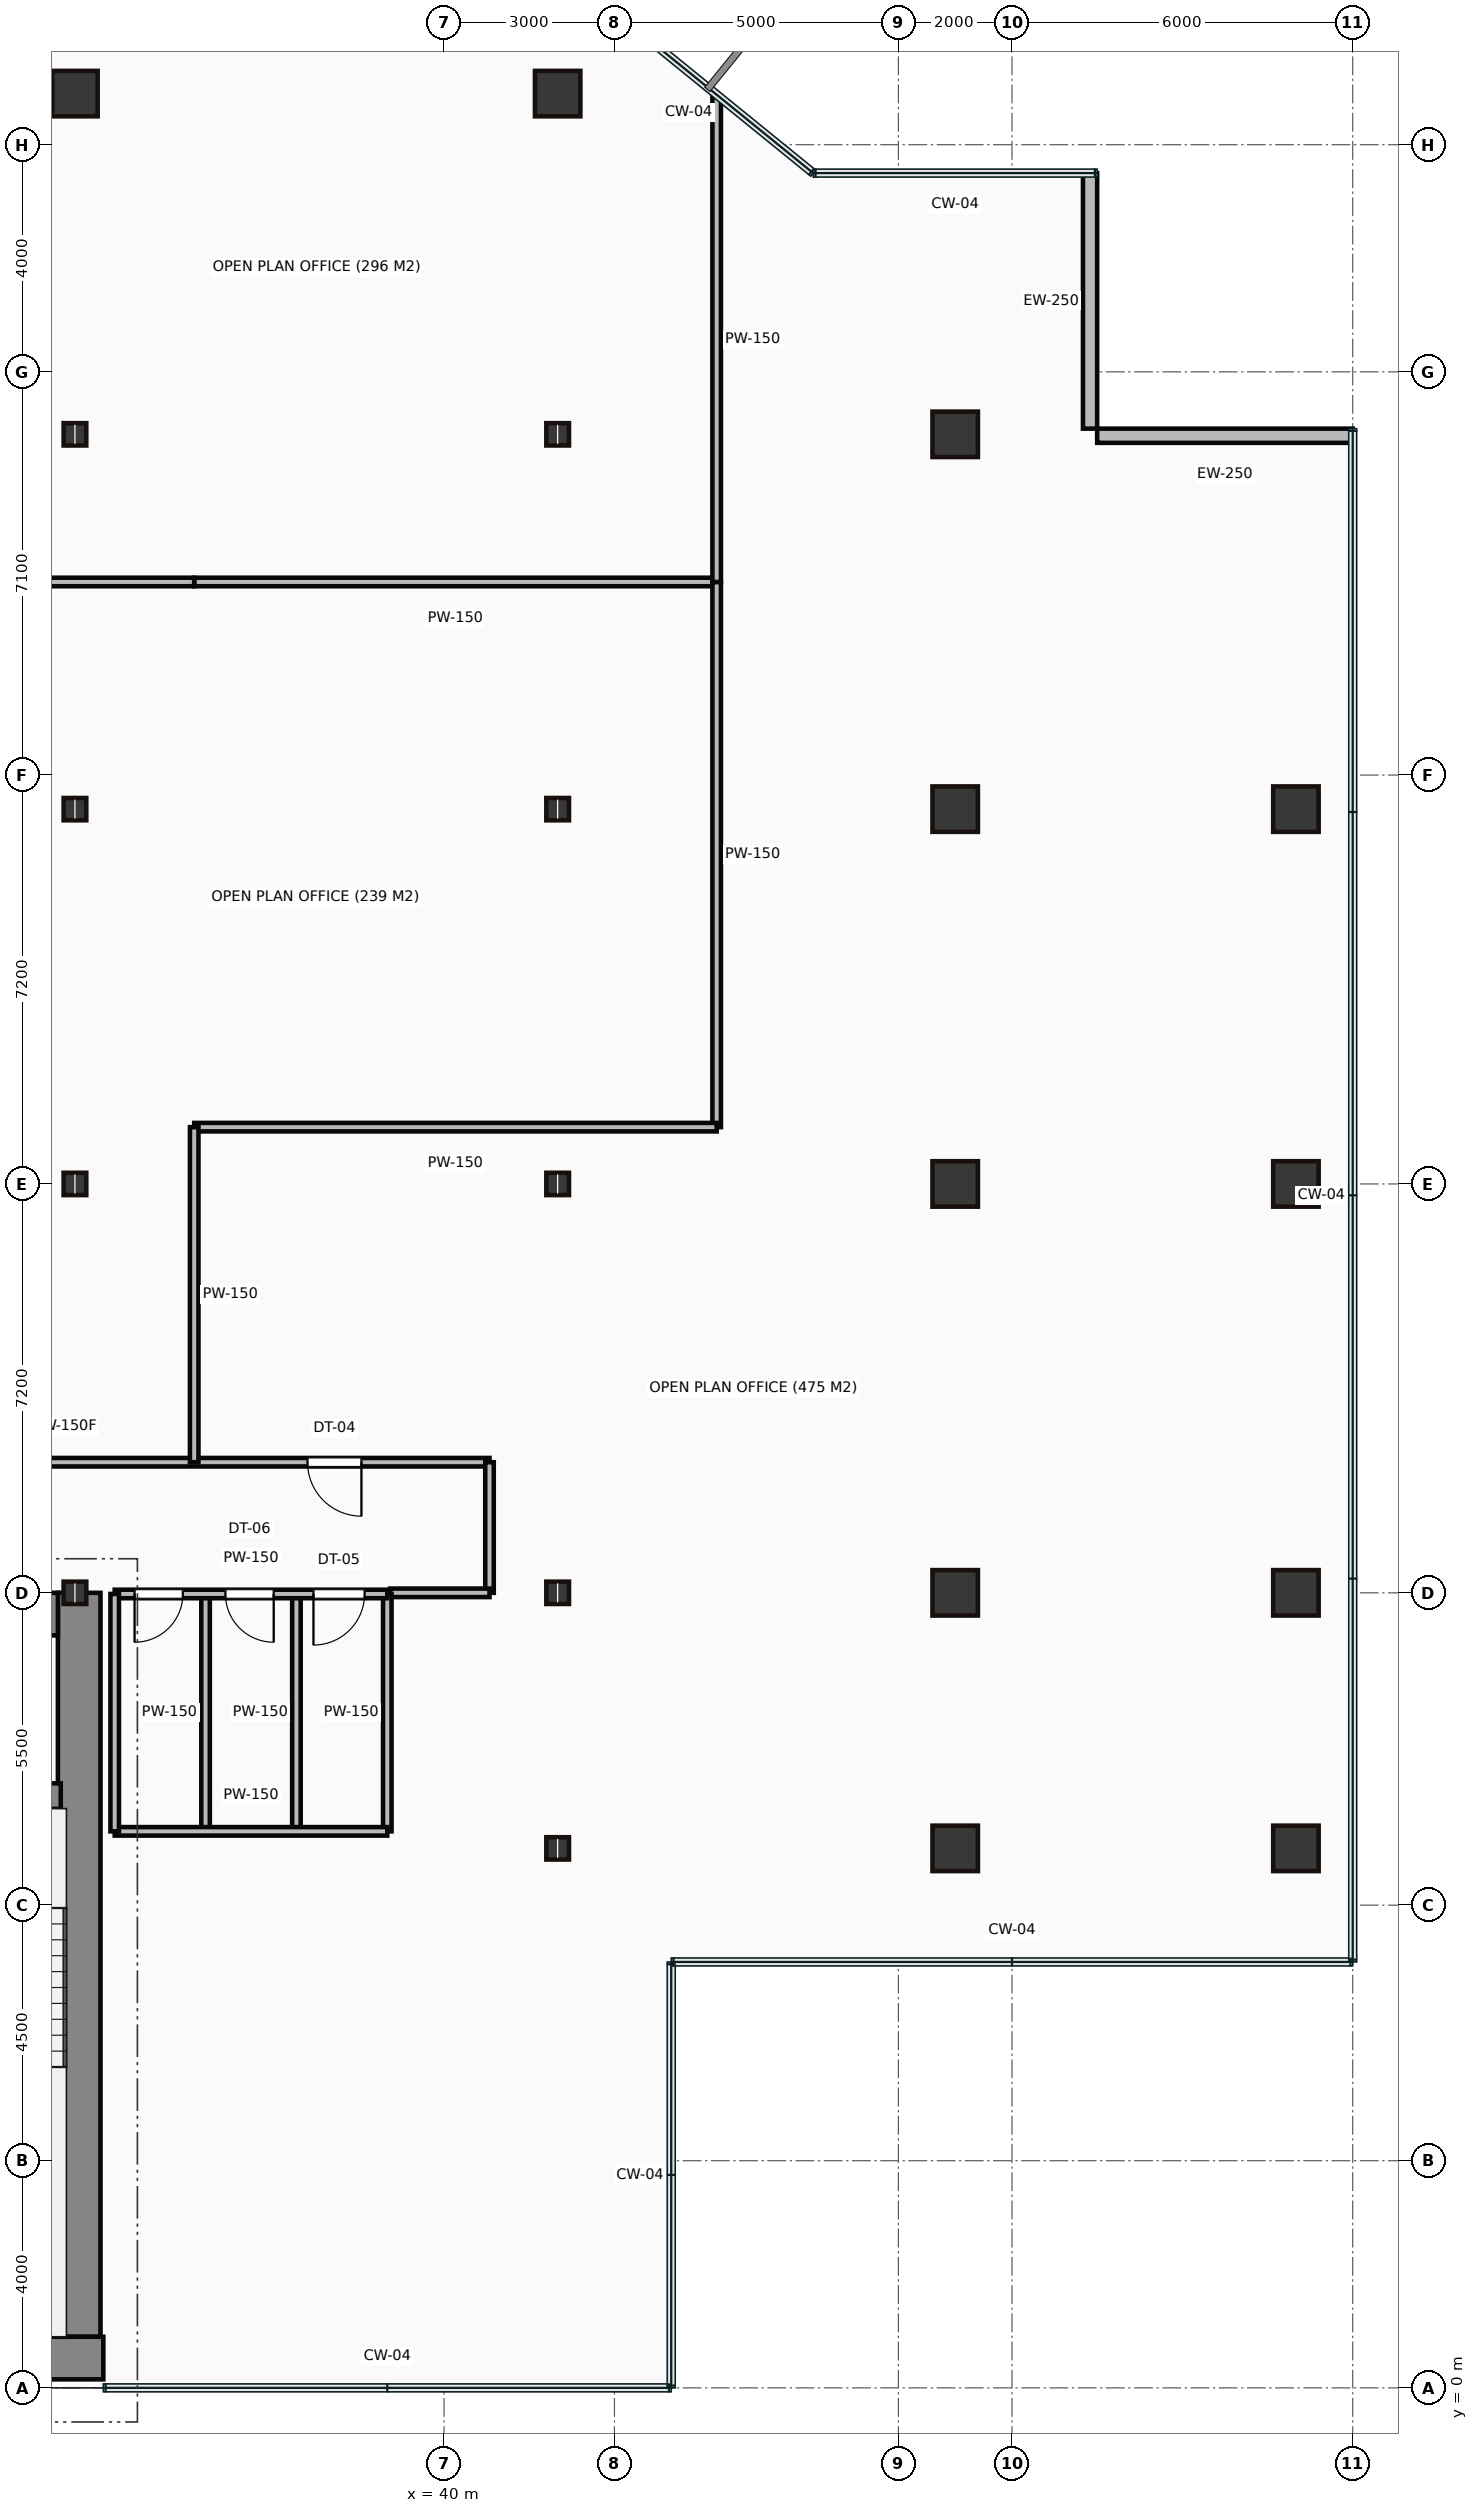
"""IFC4 building model, lengths in metres.
Left out: names, types, materials, properties, quantities, classifications, styles, units other than length and angle.
Written with IfcOpenShell. Run it as: python <this file> out.ifc"""

import sys

from ifc_helpers import new_model, si_unit, direction, frame, frame_2d, origin, origin_2d, place, context, subcontext, project, spatial, rectangle, hollow_rectangle, i_section, extrude, source, transform, mapped, element, fill, save


model = new_model("IFC4")
c1 = context("Model", 3, precision=1e-05, world=origin(), true_north=direction((0.0, 1.0)))
c2 = subcontext(c1, "Body", "Model", "MODEL_VIEW")
j1 = project(units=[si_unit("LENGTHUNIT", "METRE"), si_unit("PLANEANGLEUNIT", "RADIAN")], contexts=[c1])
p1 = place(None, origin())
s1 = spatial("IfcSite", under=j1, at=p1, CompositionType="ELEMENT")
p2 = place(p1, origin())
s2 = spatial("IfcBuilding", under=s1, at=p2, CompositionType="ELEMENT")
p3 = place(p2, frame((0.0, 0.0, 114.2)))
s3 = spatial("IfcBuildingStorey", under=s2, at=p3, CompositionType="ELEMENT", Elevation=114.2)
m1 = source(origin(), c2, "Body", "SweptSolid", [
    extrude(rectangle(XDim=29.5, YDim=0.75, at=frame_2d((14.75, 0.0))), origin(), (0.0, 0.0, 1.0), 3.65),
])
p4 = place(p3, frame((4.5, 0.525, 0.0), z_axis=(0.0, 0.0, 1.0), x_axis=(1.0, 0.0, 0.0)))
e1 = element("IfcWall", 1, at=p4, inside=s3, PredefinedType="SHEAR", context=c2, shape_type="MappedRepresentation", body=[
    mapped(m1, transform((0.0, 0.0, 0.0))),
])
m2 = source(origin(), c2, "Body", "SweptSolid", [
    extrude(rectangle(XDim=13.1, YDim=0.75, at=frame_2d((6.55, 0.0))), origin(), (0.0, 0.0, 1.0), 3.65),
])
p5 = place(p3, frame((33.575, 0.9, 0.0), z_axis=(0.0, 0.0, 1.0), x_axis=(0.0, 1.0, 0.0)))
e2 = element("IfcWall", 2, at=p5, inside=s3, PredefinedType="SHEAR", context=c2, shape_type="MappedRepresentation", body=[
    mapped(m2, transform((0.0, 0.0, 0.0))),
])
m3 = source(origin(), c2, "Body", "SweptSolid", [
    extrude(rectangle(XDim=12.6, YDim=0.75, at=frame_2d((6.3, 0.0))), origin(), (0.0, 0.0, 1.0), 3.65),
])
p6 = place(p3, frame((20.6, 13.625, 0.0), z_axis=(0.0, 0.0, 1.0), x_axis=(1.0, 0.0, 0.0)))
e3 = element("IfcWall", 3, at=p6, inside=s3, PredefinedType="SHEAR", context=c2, shape_type="MappedRepresentation", body=[
    mapped(m3, transform((0.0, 0.0, 0.0))),
])
p7 = place(p6, frame((9.25, 0.0, 0.0)))
e4 = element("IfcOpeningElement", 4, at=p7, cuts=e3, PredefinedType="OPENING", context=c2, shape_type="SweptSolid", body=[
    extrude(rectangle(XDim=1.1, YDim=2.15, at=frame_2d((0.55, 1.075))), frame((0.0, 0.385, 0.0), z_axis=(0.0, -1.0, 0.0), x_axis=(1.0, 0.0, 0.0)), (0.0, 0.0, 1.0), 0.77),
])
m4 = source(origin(), c2, "Body", "SweptSolid", [
    extrude(rectangle(XDim=3.39, YDim=0.45, at=frame_2d((1.695, 0.0))), origin(), (0.0, 0.0, 1.0), 3.65),
])
p8 = place(p3, frame((29.86, 10.42, 0.0), z_axis=(0.0, 0.0, 1.0), x_axis=(1.0, 0.0, 0.0)))
e5 = element("IfcWall", 5, at=p8, inside=s3, PredefinedType="SHEAR", context=c2, shape_type="MappedRepresentation", body=[
    mapped(m4, transform((0.0, 0.0, 0.0))),
])
p9 = place(p8, frame((1.1, 0.0, 0.0)))
e6 = element("IfcOpeningElement", 6, at=p9, cuts=e5, PredefinedType="OPENING", context=c2, shape_type="SweptSolid", body=[
    extrude(rectangle(XDim=1.1, YDim=2.15, at=frame_2d((0.55, 1.075))), frame((0.0, 0.235, 0.0), z_axis=(0.0, -1.0, 0.0), x_axis=(1.0, 0.0, 0.0)), (0.0, 0.0, 1.0), 0.47),
])
m5 = source(origin(), c2, "Body", "SweptSolid", [
    extrude(i_section(OverallWidth=0.399, OverallDepth=0.393, WebThickness=0.023, FlangeThickness=0.037, at=origin_2d()), origin(), (0.0, 0.0, 1.0), 3.65),
])
for number, where, z_axis, x_axis in (
    (7, (33.5, 14.0, 0.0), (0.0, 0.0, 1.0), (1.0, 0.0, 0.0)),
    (8, (33.5, 21.2, 0.0), (0.0, 0.0, 1.0), (1.0, 0.0, 0.0)),
    (9, (33.5, 27.8, 0.0), (0.0, 0.0, 1.0), (1.0, 0.0, 0.0)),
    (10, (33.5, 34.4, 0.0), (0.0, 0.0, 1.0), (1.0, 0.0, 0.0)),
):
    element("IfcColumn", number, at=place(p3, frame(where, z_axis=z_axis, x_axis=x_axis)), inside=s3, PredefinedType="COLUMN", context=c2, shape_type="MappedRepresentation", body=[
        mapped(m5, transform((0.0, 0.0, 0.0))),
    ])
m6 = source(origin(), c2, "Body", "SweptSolid", [
    extrude(hollow_rectangle(XDim=0.8, YDim=0.8, WallThickness=0.04, at=origin_2d()), origin(), (0.0, 0.0, 1.0), 3.65),
])
p10 = place(p3, frame((33.5, 40.4, 0.0), z_axis=(0.0, 0.0, 1.0), x_axis=(1.0, 0.0, 0.0)))
e11 = element("IfcColumn", 11, at=p10, inside=s3, PredefinedType="COLUMN", context=c2, shape_type="MappedRepresentation", body=[
    mapped(m6, transform((0.0, 0.0, 0.0))),
])
for number, where, z_axis, x_axis in (
    (12, (42.0, 9.5, 0.0), (0.0, 0.0, 1.0), (1.0, 0.0, 0.0)),
    (13, (42.0, 14.0, 0.0), (0.0, 0.0, 1.0), (1.0, 0.0, 0.0)),
    (14, (42.0, 21.2, 0.0), (0.0, 0.0, 1.0), (1.0, 0.0, 0.0)),
    (15, (42.0, 27.8, 0.0), (0.0, 0.0, 1.0), (1.0, 0.0, 0.0)),
    (16, (42.0, 34.4, 0.0), (0.0, 0.0, 1.0), (1.0, 0.0, 0.0)),
):
    element("IfcColumn", number, at=place(p3, frame(where, z_axis=z_axis, x_axis=x_axis)), inside=s3, PredefinedType="COLUMN", context=c2, shape_type="MappedRepresentation", body=[
        mapped(m5, transform((0.0, 0.0, 0.0))),
    ])
for number, where, z_axis, x_axis in (
    (17, (42.0, 40.4, 0.0), (0.0, 0.0, 1.0), (1.0, 0.0, 0.0)),
    (18, (49.0, 9.5, 0.0), (0.0, 0.0, 1.0), (1.0, 0.0, 0.0)),
    (19, (49.0, 14.0, 0.0), (0.0, 0.0, 1.0), (1.0, 0.0, 0.0)),
    (20, (49.0, 21.2, 0.0), (0.0, 0.0, 1.0), (1.0, 0.0, 0.0)),
    (21, (49.0, 27.8, 0.0), (0.0, 0.0, 1.0), (1.0, 0.0, 0.0)),
    (22, (49.0, 34.4, 0.0), (0.0, 0.0, 1.0), (1.0, 0.0, 0.0)),
    (23, (55.0, 9.5, 0.0), (0.0, 0.0, 1.0), (1.0, 0.0, 0.0)),
    (24, (55.0, 14.0, 0.0), (0.0, 0.0, 1.0), (1.0, 0.0, 0.0)),
    (25, (55.0, 21.2, 0.0), (0.0, 0.0, 1.0), (1.0, 0.0, 0.0)),
    (26, (55.0, 27.8, 0.0), (0.0, 0.0, 1.0), (1.0, 0.0, 0.0)),
):
    element("IfcColumn", number, at=place(p3, frame(where, z_axis=z_axis, x_axis=x_axis)), inside=s3, PredefinedType="COLUMN", context=c2, shape_type="MappedRepresentation", body=[
        mapped(m6, transform((0.0, 0.0, 0.0))),
    ])
m7 = source(origin(), c2, "Body", "SweptSolid", [
    extrude(rectangle(XDim=4.5, YDim=0.25, at=frame_2d((2.25, 0.0))), origin(), (0.0, 0.0, 1.0), 3.4),
])
for number, where, z_axis, x_axis in (
    (27, (56.0, 34.375, 0.0), (0.0, 0.0, 1.0), (-1.0, 0.0, 0.0)),
    (28, (51.375, 34.5, 0.0), (0.0, 0.0, 1.0), (0.0, 1.0, 0.0)),
):
    element("IfcWall", number, at=place(p3, frame(where, z_axis=z_axis, x_axis=x_axis)), inside=s3, PredefinedType="STANDARD", context=c2, shape_type="MappedRepresentation", body=[
        mapped(m7, transform((0.0, 0.0, 0.0))),
    ])
m8 = source(origin(), c2, "Body", "SweptSolid", [
    extrude(rectangle(XDim=4.8, YDim=0.15, at=frame_2d((2.4, 0.0))), origin(), (0.0, 0.0, 1.0), 2.702),
])
p11 = place(p3, frame((34.2, 13.98, 0.0), z_axis=(0.0, 0.0, 1.0), x_axis=(1.0, 0.0, 0.0)))
e29 = element("IfcWall", 29, at=p11, inside=s3, PredefinedType="PARTITIONING", context=c2, shape_type="MappedRepresentation", body=[
    mapped(m8, transform((0.0, 0.0, 0.0))),
])
p12 = place(p11, frame((0.35, 0.0, 0.0)))
e30 = element("IfcOpeningElement", 30, at=p12, cuts=e29, PredefinedType="OPENING", context=c2, shape_type="SweptSolid", body=[
    extrude(rectangle(XDim=0.85, YDim=2.1, at=frame_2d((0.425, 1.05))), frame((0.0, 0.085, 0.0), z_axis=(0.0, -1.0, 0.0), x_axis=(1.0, 0.0, 0.0)), (0.0, 0.0, 1.0), 0.17),
])
p13 = place(p11, frame((1.95, 0.0, 0.0)))
e31 = element("IfcOpeningElement", 31, at=p13, cuts=e29, PredefinedType="OPENING", context=c2, shape_type="SweptSolid", body=[
    extrude(rectangle(XDim=0.85, YDim=2.1, at=frame_2d((0.425, 1.05))), frame((0.0, 0.085, 0.0), z_axis=(0.0, -1.0, 0.0), x_axis=(1.0, 0.0, 0.0)), (0.0, 0.0, 1.0), 0.17),
])
p14 = place(p11, frame((3.5, 0.0, 0.0)))
e32 = element("IfcOpeningElement", 32, at=p14, cuts=e29, PredefinedType="OPENING", context=c2, shape_type="SweptSolid", body=[
    extrude(rectangle(XDim=0.9, YDim=2.1, at=frame_2d((0.45, 1.05))), frame((0.0, 0.085, 0.0), z_axis=(0.0, -1.0, 0.0), x_axis=(1.0, 0.0, 0.0)), (0.0, 0.0, 1.0), 0.17),
])
m9 = source(origin(), c2, "Body", "SweptSolid", [
    extrude(rectangle(XDim=4.8, YDim=0.15, at=frame_2d((2.4, 0.0))), origin(), (0.0, 0.0, 1.0), 3.4),
])
p15 = place(p3, frame((34.2, 9.8, 0.0), z_axis=(0.0, 0.0, 1.0), x_axis=(1.0, 0.0, 0.0)))
e33 = element("IfcWall", 33, at=p15, inside=s3, PredefinedType="PARTITIONING", context=c2, shape_type="MappedRepresentation", body=[
    mapped(m9, transform((0.0, 0.0, 0.0))),
])
m10 = source(origin(), c2, "Body", "SweptSolid", [
    extrude(rectangle(XDim=4.18, YDim=0.15, at=frame_2d((2.09, 0.0))), origin(), (0.0, 0.0, 1.0), 3.4),
])
for number, where, z_axis, x_axis in (
    (34, (39.0, 9.8, 0.0), (0.0, 0.0, 1.0), (0.0, 1.0, 0.0)),
    (35, (34.2, 9.8, 0.0), (0.0, 0.0, 1.0), (0.0, 1.0, 0.0)),
    (36, (35.8, 9.8, 0.0), (0.0, 0.0, 1.0), (0.0, 1.0, 0.0)),
    (37, (37.4, 9.8, 0.0), (0.0, 0.0, 1.0), (0.0, 1.0, 0.0)),
):
    element("IfcWall", number, at=place(p3, frame(where, z_axis=z_axis, x_axis=x_axis)), inside=s3, PredefinedType="PARTITIONING", context=c2, shape_type="MappedRepresentation", body=[
        mapped(m10, transform((0.0, 0.0, 0.0))),
    ])
m11 = source(origin(), c2, "Body", "SweptSolid", [
    extrude(rectangle(XDim=14.95, YDim=0.15, at=frame_2d((7.475, 0.0))), origin(), (0.0, 0.0, 1.0), 3.4),
])
p16 = place(p3, frame((25.85, 16.3, 0.0), z_axis=(0.0, 0.0, 1.0), x_axis=(1.0, 0.0, 0.0)))
e38 = element("IfcWall", 38, at=p16, inside=s3, PredefinedType="PARTITIONING", context=c2, shape_type="MappedRepresentation", body=[
    mapped(m11, transform((0.0, 0.0, 0.0))),
])
p17 = place(p16, frame((11.745, 0.0, 0.0)))
e39 = element("IfcOpeningElement", 39, at=p17, cuts=e38, PredefinedType="OPENING", context=c2, shape_type="SweptSolid", body=[
    extrude(rectangle(XDim=0.95, YDim=2.15, at=frame_2d((0.475, 1.075))), frame((0.0, 0.085, 0.0), z_axis=(0.0, -1.0, 0.0), x_axis=(1.0, 0.0, 0.0)), (0.0, 0.0, 1.0), 0.17),
])
m12 = source(origin(), c2, "Body", "SweptSolid", [
    extrude(rectangle(XDim=2.3, YDim=0.15, at=frame_2d((1.15, 0.0))), origin(), (0.0, 0.0, 1.0), 3.4),
])
p18 = place(p3, frame((40.8, 16.3, 0.0), z_axis=(0.0, 0.0, 1.0), x_axis=(0.0, -1.0, 0.0)))
e40 = element("IfcWall", 40, at=p18, inside=s3, PredefinedType="PARTITIONING", context=c2, shape_type="MappedRepresentation", body=[
    mapped(m12, transform((0.0, 0.0, 0.0))),
])
m13 = source(origin(), c2, "Body", "SweptSolid", [
    extrude(rectangle(XDim=1.75, YDim=0.15, at=frame_2d((0.875, 0.0))), origin(), (0.0, 0.0, 1.0), 2.702),
])
p19 = place(p3, frame((40.8, 14.0, 0.0), z_axis=(0.0, 0.0, 1.0), x_axis=(-1.0, 0.0, 0.0)))
e41 = element("IfcWall", 41, at=p19, inside=s3, PredefinedType="PARTITIONING", context=c2, shape_type="MappedRepresentation", body=[
    mapped(m13, transform((0.0, 0.0, 0.0))),
])
m14 = source(origin(), c2, "Body", "SweptSolid", [
    extrude(rectangle(XDim=9.2, YDim=0.15, at=frame_2d((4.6, 0.0))), origin(), (0.0, 0.0, 1.0), 3.4),
])
p20 = place(p3, frame((44.8, 31.8, 0.0), z_axis=(0.0, 0.0, 1.0), x_axis=(-1.0, 0.0, 0.0)))
e42 = element("IfcWall", 42, at=p20, inside=s3, PredefinedType="PARTITIONING", context=c2, shape_type="MappedRepresentation", body=[
    mapped(m14, transform((0.0, 0.0, 0.0))),
])
m15 = source(origin(), c2, "Body", "SweptSolid", [
    extrude(rectangle(XDim=9.2, YDim=0.15, at=frame_2d((4.6, 0.0))), origin(), (0.0, 0.0, 1.0), 3.4),
])
p21 = place(p3, frame((35.6, 31.8, 0.0), z_axis=(0.0, 0.0, 1.0), x_axis=(-1.0, 0.0, 0.0)))
e43 = element("IfcWall", 43, at=p21, inside=s3, PredefinedType="PARTITIONING", context=c2, shape_type="MappedRepresentation", body=[
    mapped(m15, transform((0.0, 0.0, 0.0))),
])
m16 = source(origin(), c2, "Body", "SweptSolid", [
    extrude(rectangle(XDim=9.6, YDim=0.15, at=frame_2d((4.8, 0.0))), origin(), (0.0, 0.0, 1.0), 3.4),
])
p22 = place(p3, frame((44.8, 31.8, 0.0), z_axis=(0.0, 0.0, 1.0), x_axis=(0.0, -1.0, 0.0)))
e44 = element("IfcWall", 44, at=p22, inside=s3, PredefinedType="PARTITIONING", context=c2, shape_type="MappedRepresentation", body=[
    mapped(m16, transform((0.0, 0.0, 0.0))),
])
p23 = place(p3, frame((44.8, 22.2, 0.0), z_axis=(0.0, 0.0, 1.0), x_axis=(-1.0, 0.0, 0.0)))
e45 = element("IfcWall", 45, at=p23, inside=s3, PredefinedType="PARTITIONING", context=c2, shape_type="MappedRepresentation", body=[
    mapped(m14, transform((0.0, 0.0, 0.0))),
])
m17 = source(origin(), c2, "Body", "SweptSolid", [
    extrude(rectangle(XDim=5.9, YDim=0.15, at=frame_2d((2.95, 0.0))), origin(), (0.0, 0.0, 1.0), 3.4),
])
p24 = place(p3, frame((35.6, 22.2, 0.0), z_axis=(0.0, 0.0, 1.0), x_axis=(0.0, -1.0, 0.0)))
e46 = element("IfcWall", 46, at=p24, inside=s3, PredefinedType="PARTITIONING", context=c2, shape_type="MappedRepresentation", body=[
    mapped(m17, transform((0.0, 0.0, 0.0))),
])
m18 = source(origin(), c2, "Body", "SweptSolid", [
    extrude(rectangle(XDim=8.555, YDim=0.15, at=frame_2d((4.277, 0.0))), origin(), (0.0, 0.0, 1.0), 3.4),
])
p25 = place(p3, frame((44.8, 40.355, 0.0), z_axis=(0.0, 0.0, 1.0), x_axis=(0.0, -1.0, 0.0)))
e47 = element("IfcWall", 47, at=p25, inside=s3, PredefinedType="PARTITIONING", context=c2, shape_type="MappedRepresentation", body=[
    mapped(m18, transform((0.0, 0.0, 0.0))),
])
m19 = source(origin(), c2, "Body", "SweptSolid", [
    extrude(rectangle(XDim=0.85, YDim=2.1, at=frame_2d((0.425, 1.05))), frame((0.0, 0.025, 0.0), z_axis=(0.0, -1.0, 0.0), x_axis=(1.0, 0.0, 0.0)), (0.0, 0.0, 1.0), 0.05),
])
p26 = place(p12, frame((0.85, 0.0, 0.0), z_axis=(0.0, 0.0, 1.0), x_axis=(-1.0, 0.0, 0.0)))
e48 = element("IfcDoor", 48, at=p26, inside=s3, OperationType="SINGLE_SWING_LEFT", PredefinedType="DOOR", context=c2, shape_type="MappedRepresentation", body=[
    mapped(m19, transform((0.0, 0.0, 0.0))),
])
fill(e30, e48)
p27 = place(p13, frame((0.85, 0.0, 0.0), z_axis=(0.0, 0.0, 1.0), x_axis=(-1.0, 0.0, 0.0)))
e49 = element("IfcDoor", 49, at=p27, inside=s3, OperationType="SINGLE_SWING_RIGHT", PredefinedType="DOOR", context=c2, shape_type="MappedRepresentation", body=[
    mapped(m19, transform((0.0, 0.0, 0.0))),
])
fill(e31, e49)
m20 = source(origin(), c2, "Body", "SweptSolid", [
    extrude(rectangle(XDim=0.9, YDim=2.1, at=frame_2d((0.45, 1.05))), frame((0.0, 0.025, 0.0), z_axis=(0.0, -1.0, 0.0), x_axis=(1.0, 0.0, 0.0)), (0.0, 0.0, 1.0), 0.05),
])
p28 = place(p14, frame((0.9, 0.0, 0.0), z_axis=(0.0, 0.0, 1.0), x_axis=(-1.0, 0.0, 0.0)))
e50 = element("IfcDoor", 50, at=p28, inside=s3, OperationType="SINGLE_SWING_LEFT", PredefinedType="DOOR", context=c2, shape_type="MappedRepresentation", body=[
    mapped(m20, transform((0.0, 0.0, 0.0))),
])
fill(e32, e50)
m21 = source(origin(), c2, "Body", "SweptSolid", [
    extrude(rectangle(XDim=0.95, YDim=2.15, at=frame_2d((0.475, 1.075))), frame((0.0, 0.025, 0.0), z_axis=(0.0, -1.0, 0.0), x_axis=(1.0, 0.0, 0.0)), (0.0, 0.0, 1.0), 0.05),
])
p29 = place(p17, origin())
e51 = element("IfcDoor", 51, at=p29, inside=s3, OperationType="SINGLE_SWING_RIGHT", PredefinedType="DOOR", context=c2, shape_type="MappedRepresentation", body=[
    mapped(m21, transform((0.0, 0.0, 0.0))),
])
fill(e39, e51)
save(model, sys.argv[1])
